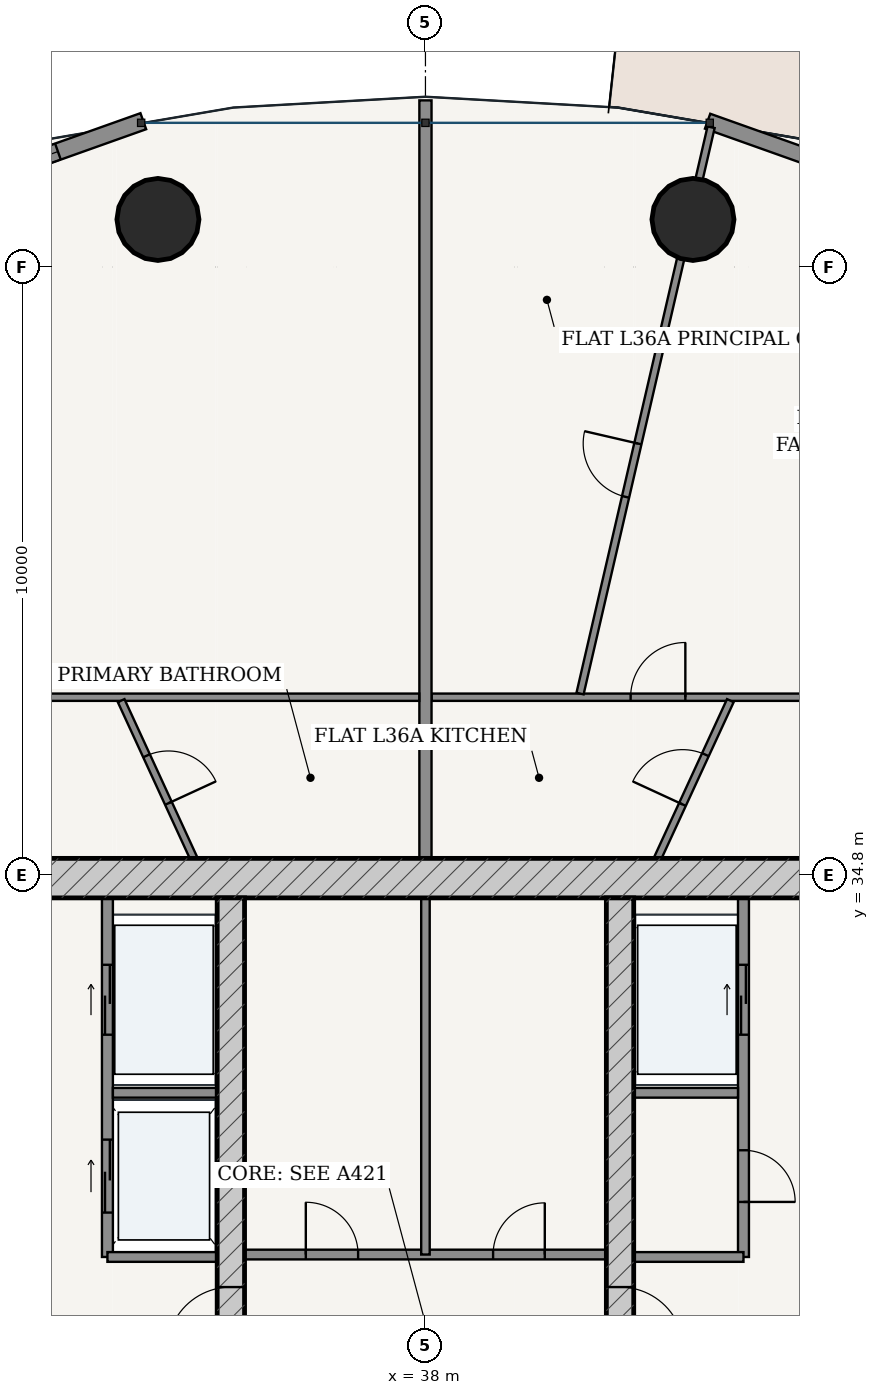
"""IFC4 building model, lengths in metres.
Left out: names, types, materials, properties, quantities, classifications, styles, units other than length and angle.
Written with IfcOpenShell. Run it as: python <this file> out.ifc"""

import sys

from ifc_helpers import new_model, si_unit, direction, frame, frame_2d, origin, origin_2d, place, context, subcontext, project, spatial, rectangle, hollow_circle, extrude, source, transform, mapped, element, fill, save


model = new_model("IFC4")
c1 = context("Model", 3, precision=1e-05, world=origin(), true_north=direction((-0.2419218956, 0.970295726276)))
c2 = subcontext(c1, "Body", "Model", "MODEL_VIEW")
j1 = project(units=[si_unit("LENGTHUNIT", "METRE"), si_unit("PLANEANGLEUNIT", "RADIAN")], contexts=[c1])
p1 = place(None, origin())
s1 = spatial("IfcSite", under=j1, at=p1, CompositionType="ELEMENT")
p2 = place(p1, origin())
s2 = spatial("IfcBuilding", under=s1, at=p2, CompositionType="ELEMENT")
p3 = place(p2, frame((0.0, 0.0, 139.0)))
s3 = spatial("IfcBuildingStorey", under=s2, at=p3, CompositionType="ELEMENT", Elevation=139.0)
p4 = place(p3, frame((28.725, 34.75, 0.0), z_axis=(0.0, 0.0, 1.0), x_axis=(1.0, 0.0, 0.0)))
e1 = element("IfcWall", 1, at=p4, inside=s3, PredefinedType="SHEAR", context=c2, shape_type="SweptSolid", body=[
    extrude(rectangle(XDim=18.55, YDim=0.65, at=frame_2d((9.275, 0.0))), origin(), (0.0, 0.0, 1.0), 3.33),
])
p5 = place(p3, frame((34.8, 19.175, 0.0), z_axis=(0.0, 0.0, 1.0), x_axis=(0.0, 1.0, 0.0)))
e2 = element("IfcWall", 2, at=p5, inside=s3, PredefinedType="SHEAR", context=c2, shape_type="SweptSolid", body=[
    extrude(rectangle(XDim=15.25, YDim=0.45, at=frame_2d((7.625, 0.0))), origin(), (0.0, 0.0, 1.0), 3.33),
])
p6 = place(p5, frame((7.8, 0.0, 0.0)))
e3 = element("IfcOpeningElement", 3, at=p6, cuts=e2, PredefinedType="OPENING", context=c2, shape_type="SweptSolid", body=[
    extrude(rectangle(XDim=1.05, YDim=2.15, at=frame_2d((0.525, 1.075))), frame((0.0, 0.235, 0.0), z_axis=(0.0, -1.0, 0.0), x_axis=(1.0, 0.0, 0.0)), (0.0, 0.0, 1.0), 0.47),
])
p7 = place(p3, frame((41.2, 19.175, 0.0), z_axis=(0.0, 0.0, 1.0), x_axis=(0.0, 1.0, 0.0)))
e4 = element("IfcWall", 4, at=p7, inside=s3, PredefinedType="SHEAR", context=c2, shape_type="SweptSolid", body=[
    extrude(rectangle(XDim=15.25, YDim=0.45, at=frame_2d((7.625, 0.0))), origin(), (0.0, 0.0, 1.0), 3.33),
])
p8 = place(p7, frame((7.8, 0.0, 0.0)))
e5 = element("IfcOpeningElement", 5, at=p8, cuts=e4, PredefinedType="OPENING", context=c2, shape_type="SweptSolid", body=[
    extrude(rectangle(XDim=1.05, YDim=2.15, at=frame_2d((0.525, 1.075))), frame((0.0, 0.235, 0.0), z_axis=(0.0, -1.0, 0.0), x_axis=(1.0, 0.0, 0.0)), (0.0, 0.0, 1.0), 0.47),
])
for number, where, z_axis, x_axis in (
    (6, (42.399, 45.582, 0.0), (0.0, 0.0, 1.0), (1.0, 0.0, 0.0)),
    (7, (33.601, 45.582, 0.0), (0.0, 0.0, 1.0), (1.0, 0.0, 0.0)),
):
    element("IfcColumn", number, at=place(p3, frame(where, z_axis=z_axis, x_axis=x_axis)), inside=s3, PredefinedType="COLUMN", context=c2, shape_type="SweptSolid", body=[
        extrude(hollow_circle(Radius=0.675, WallThickness=0.042, at=origin_2d()), origin(), (0.0, 0.0, 1.0), 3.6),
    ])
p9 = place(p3, frame((51.503, 44.043, 0.0), z_axis=(0.0, 0.0, 1.0), x_axis=(-0.942095406405, 0.335344964522, 0.0)))
e8 = element("IfcWall", 8, at=p9, inside=s3, PredefinedType="SOLIDWALL", context=c2, shape_type="SweptSolid", body=[
    extrude(rectangle(XDim=9.408, YDim=0.26, at=frame_2d((4.704, 0.0))), origin(), (0.0, 0.0, 1.0), 3.33),
])
p10 = place(p9, frame((4.029, 0.0, 0.0)))
e9 = element("IfcOpeningElement", 9, at=p10, cuts=e8, PredefinedType="OPENING", context=c2, shape_type="SweptSolid", body=[
    extrude(rectangle(XDim=1.35, YDim=2.2, at=frame_2d((0.675, 1.1))), frame((0.0, 0.14, 0.0), z_axis=(0.0, -1.0, 0.0), x_axis=(1.0, 0.0, 0.0)), (0.0, 0.0, 1.0), 0.28),
])
p11 = place(p3, frame((33.36, 47.198, 0.0), z_axis=(0.0, 0.0, 1.0), x_axis=(-0.942095406405, -0.335344964522, 0.0)))
e10 = element("IfcWall", 10, at=p11, inside=s3, PredefinedType="SOLIDWALL", context=c2, shape_type="SweptSolid", body=[
    extrude(rectangle(XDim=9.408, YDim=0.28, at=frame_2d((4.704, 0.0))), origin(), (0.0, 0.0, 1.0), 3.33),
])
p12 = place(p11, frame((1.49, 0.0, 0.85)))
e11 = element("IfcOpeningElement", 11, at=p12, cuts=e10, PredefinedType="OPENING", context=c2, shape_type="SweptSolid", body=[
    extrude(rectangle(XDim=2.1, YDim=1.95, at=frame_2d((1.05, 0.975))), frame((0.0, 0.15, 0.0), z_axis=(0.0, -1.0, 0.0), x_axis=(1.0, 0.0, 0.0)), (0.0, 0.0, 1.0), 0.3),
])
p13 = place(p11, frame((5.818, 0.0, 0.85)))
e12 = element("IfcOpeningElement", 12, at=p13, cuts=e10, PredefinedType="OPENING", context=c2, shape_type="SweptSolid", body=[
    extrude(rectangle(XDim=2.1, YDim=1.95, at=frame_2d((1.05, 0.975))), frame((0.0, 0.15, 0.0), z_axis=(0.0, -1.0, 0.0), x_axis=(1.0, 0.0, 0.0)), (0.0, 0.0, 1.0), 0.3),
])
p14 = place(p3, frame((32.77, 28.52, 0.0), z_axis=(0.0, 0.0, 1.0), x_axis=(0.0, 1.0, 0.0)))
e13 = element("IfcWall", 13, at=p14, inside=s3, PredefinedType="PARTITIONING", context=c2, shape_type="SweptSolid", body=[
    extrude(rectangle(XDim=5.905, YDim=0.18, at=frame_2d((2.953, 0.0))), origin(), (0.0, 0.0, 1.0), 3.33),
])
p15 = place(p14, frame((3.655, 0.0, 0.0)))
e14 = element("IfcOpeningElement", 14, at=p15, cuts=e13, PredefinedType="OPENING", context=c2, shape_type="SweptSolid", body=[
    extrude(rectangle(XDim=1.15, YDim=2.2, at=frame_2d((0.575, 1.1))), frame((0.0, 0.1, 0.0), z_axis=(0.0, -1.0, 0.0), x_axis=(1.0, 0.0, 0.0)), (0.0, 0.0, 1.0), 0.2),
])
p16 = place(p14, frame((0.73, 0.0, 0.0)))
e15 = element("IfcOpeningElement", 15, at=p16, cuts=e13, PredefinedType="OPENING", context=c2, shape_type="SweptSolid", body=[
    extrude(rectangle(XDim=1.2, YDim=2.25, at=frame_2d((0.6, 1.125))), frame((0.0, 0.1, 0.0), z_axis=(0.0, -1.0, 0.0), x_axis=(1.0, 0.0, 0.0)), (0.0, 0.0, 1.0), 0.2),
])
p17 = place(p3, frame((32.86, 31.22, 0.0), z_axis=(0.0, 0.0, 1.0), x_axis=(1.0, 0.0, 0.0)))
e16 = element("IfcWall", 16, at=p17, inside=s3, PredefinedType="PARTITIONING", context=c2, shape_type="SweptSolid", body=[
    extrude(rectangle(XDim=1.715, YDim=0.16, at=frame_2d((0.857, 0.0))), origin(), (0.0, 0.0, 1.0), 3.33),
])
p18 = place(p3, frame((32.77, 28.52, 0.0), z_axis=(0.0, 0.0, 1.0), x_axis=(1.0, 0.0, 0.0)))
e17 = element("IfcWall", 17, at=p18, inside=s3, PredefinedType="PARTITIONING", context=c2, shape_type="SweptSolid", body=[
    extrude(rectangle(XDim=1.805, YDim=0.16, at=frame_2d((0.902, 0.0))), origin(), (0.0, 0.0, 1.0), 3.33),
])
p19 = place(p3, frame((43.23, 28.52, 0.0), z_axis=(0.0, 0.0, 1.0), x_axis=(0.0, 1.0, 0.0)))
e18 = element("IfcWall", 18, at=p19, inside=s3, PredefinedType="PARTITIONING", context=c2, shape_type="SweptSolid", body=[
    extrude(rectangle(XDim=5.905, YDim=0.18, at=frame_2d((2.953, 0.0))), origin(), (0.0, 0.0, 1.0), 3.33),
])
p20 = place(p19, frame((0.905, 0.0, 0.0)))
e19 = element("IfcOpeningElement", 19, at=p20, cuts=e18, PredefinedType="OPENING", context=c2, shape_type="SweptSolid", body=[
    extrude(rectangle(XDim=0.85, YDim=2.1, at=frame_2d((0.425, 1.05))), frame((0.0, 0.1, 0.0), z_axis=(0.0, -1.0, 0.0), x_axis=(1.0, 0.0, 0.0)), (0.0, 0.0, 1.0), 0.2),
])
p21 = place(p19, frame((3.655, 0.0, 0.0)))
e20 = element("IfcOpeningElement", 20, at=p21, cuts=e18, PredefinedType="OPENING", context=c2, shape_type="SweptSolid", body=[
    extrude(rectangle(XDim=1.15, YDim=2.2, at=frame_2d((0.575, 1.1))), frame((0.0, 0.1, 0.0), z_axis=(0.0, -1.0, 0.0), x_axis=(1.0, 0.0, 0.0)), (0.0, 0.0, 1.0), 0.2),
])
p22 = place(p3, frame((41.425, 31.22, 0.0), z_axis=(0.0, 0.0, 1.0), x_axis=(1.0, 0.0, 0.0)))
e21 = element("IfcWall", 21, at=p22, inside=s3, PredefinedType="PARTITIONING", context=c2, shape_type="SweptSolid", body=[
    extrude(rectangle(XDim=1.715, YDim=0.16, at=frame_2d((0.857, 0.0))), origin(), (0.0, 0.0, 1.0), 3.33),
])
p23 = place(p3, frame((41.425, 28.52, 0.0), z_axis=(0.0, 0.0, 1.0), x_axis=(1.0, 0.0, 0.0)))
e22 = element("IfcWall", 22, at=p23, inside=s3, PredefinedType="PARTITIONING", context=c2, shape_type="SweptSolid", body=[
    extrude(rectangle(XDim=1.805, YDim=0.16, at=frame_2d((0.902, 0.0))), origin(), (0.0, 0.0, 1.0), 3.33),
])
p24 = place(p3, frame((35.025, 28.56, 0.0), z_axis=(0.0, 0.0, 1.0), x_axis=(1.0, 0.0, 0.0)))
e23 = element("IfcWall", 23, at=p24, inside=s3, PredefinedType="PARTITIONING", context=c2, shape_type="SweptSolid", body=[
    extrude(rectangle(XDim=5.95, YDim=0.16, at=frame_2d((2.975, 0.0))), origin(), (0.0, 0.0, 1.0), 3.33),
])
p25 = place(p24, frame((1.008, 0.0, 0.0)))
e24 = element("IfcOpeningElement", 24, at=p25, cuts=e23, PredefinedType="OPENING", context=c2, shape_type="SweptSolid", body=[
    extrude(rectangle(XDim=0.86, YDim=2.1, at=frame_2d((0.43, 1.05))), frame((0.0, 0.09, 0.0), z_axis=(0.0, -1.0, 0.0), x_axis=(1.0, 0.0, 0.0)), (0.0, 0.0, 1.0), 0.18),
])
p26 = place(p24, frame((4.087, 0.0, 0.0)))
e25 = element("IfcOpeningElement", 25, at=p26, cuts=e23, PredefinedType="OPENING", context=c2, shape_type="SweptSolid", body=[
    extrude(rectangle(XDim=0.85, YDim=2.1, at=frame_2d((0.425, 1.05))), frame((0.0, 0.09, 0.0), z_axis=(0.0, -1.0, 0.0), x_axis=(1.0, 0.0, 0.0)), (0.0, 0.0, 1.0), 0.18),
])
p27 = place(p3, frame((38.0, 28.56, 0.0), z_axis=(0.0, 0.0, 1.0), x_axis=(0.0, 1.0, 0.0)))
e26 = element("IfcWall", 26, at=p27, inside=s3, PredefinedType="PARTITIONING", context=c2, shape_type="SweptSolid", body=[
    extrude(rectangle(XDim=5.865, YDim=0.14, at=frame_2d((2.933, 0.0))), origin(), (0.0, 0.0, 1.0), 3.33),
])
p28 = place(p3, frame((38.102, 37.725, 0.0), z_axis=(0.0, 0.0, 1.0), x_axis=(1.0, 0.0, 0.0)))
e27 = element("IfcWall", 27, at=p28, inside=s3, PredefinedType="PARTITIONING", context=c2, shape_type="SweptSolid", body=[
    extrude(rectangle(XDim=6.363, YDim=0.12, at=frame_2d((3.182, 0.0))), origin(), (0.0, 0.0, 1.0), 2.776),
])
p29 = place(p28, frame((3.272, 0.0, 0.0)))
e28 = element("IfcOpeningElement", 28, at=p29, cuts=e27, PredefinedType="OPENING", context=c2, shape_type="SweptSolid", body=[
    extrude(rectangle(XDim=0.9, YDim=2.15, at=frame_2d((0.45, 1.075))), frame((0.0, 0.07, 0.0), z_axis=(0.0, -1.0, 0.0), x_axis=(1.0, 0.0, 0.0)), (0.0, 0.0, 1.0), 0.14),
])
p30 = place(p3, frame((40.542, 37.785, 0.0), z_axis=(0.0, 0.0, 1.0), x_axis=(0.225467545633, 0.974250679171, 0.0)))
e29 = element("IfcWall", 29, at=p30, inside=s3, PredefinedType="PARTITIONING", context=c2, shape_type="SweptSolid", body=[
    extrude(rectangle(XDim=9.559, YDim=0.12, at=frame_2d((4.78, 0.0))), origin(), (0.0, 0.0, 1.0), 2.776),
])
p31 = place(p30, frame((3.32, 0.0, 0.0)))
e30 = element("IfcOpeningElement", 30, at=p31, cuts=e29, PredefinedType="OPENING", context=c2, shape_type="SweptSolid", body=[
    extrude(rectangle(XDim=0.9, YDim=2.15, at=frame_2d((0.45, 1.075))), frame((0.0, 0.07, 0.0), z_axis=(0.0, -1.0, 0.0), x_axis=(1.0, 0.0, 0.0)), (0.0, 0.0, 1.0), 0.14),
])
p32 = place(p3, frame((41.817, 35.075, 0.0), z_axis=(0.0, 0.0, 1.0), x_axis=(0.418890148101, 0.908036917655, 0.0)))
e31 = element("IfcWall", 31, at=p32, inside=s3, PredefinedType="PARTITIONING", context=c2, shape_type="SweptSolid", body=[
    extrude(rectangle(XDim=2.856, YDim=0.12, at=frame_2d((1.428, 0.0))), origin(), (0.0, 0.0, 1.0), 3.33),
])
p33 = place(p32, frame((0.978, 0.0, 0.0)))
e32 = element("IfcOpeningElement", 32, at=p33, cuts=e31, PredefinedType="OPENING", context=c2, shape_type="SweptSolid", body=[
    extrude(rectangle(XDim=0.9, YDim=2.15, at=frame_2d((0.45, 1.075))), frame((0.0, 0.07, 0.0), z_axis=(0.0, -1.0, 0.0), x_axis=(1.0, 0.0, 0.0)), (0.0, 0.0, 1.0), 0.14),
])
p34 = place(p3, frame((38.0, 35.075, 0.0), z_axis=(0.0, 0.0, 1.0), x_axis=(0.0, 1.0, 0.0)))
e33 = element("IfcWall", 33, at=p34, inside=s3, PredefinedType="PARTITIONING", context=c2, shape_type="SweptSolid", body=[
    extrude(rectangle(XDim=12.465, YDim=0.2, at=frame_2d((6.232, 0.0))), origin(), (0.0, 0.0, 1.0), 2.415),
])
p35 = place(p3, frame((31.535, 37.725, 0.0), z_axis=(0.0, 0.0, 1.0), x_axis=(1.0, 0.0, 0.0)))
e34 = element("IfcWall", 34, at=p35, inside=s3, PredefinedType="PARTITIONING", context=c2, shape_type="SweptSolid", body=[
    extrude(rectangle(XDim=6.363, YDim=0.12, at=frame_2d((3.182, 0.0))), origin(), (0.0, 0.0, 1.0), 2.776),
])
p36 = place(p3, frame((34.19, 35.075, 0.0), z_axis=(0.0, 0.0, 1.0), x_axis=(-0.418255585009, 0.908329381672, 0.0)))
e35 = element("IfcWall", 35, at=p36, inside=s3, PredefinedType="PARTITIONING", context=c2, shape_type="SweptSolid", body=[
    extrude(rectangle(XDim=2.855, YDim=0.12, at=frame_2d((1.428, 0.0))), origin(), (0.0, 0.0, 1.0), 3.33),
])
p37 = place(p36, frame((0.998, 0.0, 0.0)))
e36 = element("IfcOpeningElement", 36, at=p37, cuts=e35, PredefinedType="OPENING", context=c2, shape_type="SweptSolid", body=[
    extrude(rectangle(XDim=0.86, YDim=2.15, at=frame_2d((0.43, 1.075))), frame((0.0, 0.07, 0.0), z_axis=(0.0, -1.0, 0.0), x_axis=(1.0, 0.0, 0.0)), (0.0, 0.0, 1.0), 0.14),
])
m1 = source(origin(), c2, "Body", "SweptSolid", [
    extrude(rectangle(XDim=2.1, YDim=1.95, at=frame_2d((1.05, 0.975))), frame((0.0, 0.03, 0.0), z_axis=(0.0, -1.0, 0.0), x_axis=(1.0, 0.0, 0.0)), (0.0, 0.0, 1.0), 0.06),
])
p38 = place(p12, origin())
e37 = element("IfcWindow", 37, at=p38, inside=s3, PartitioningType="SINGLE_PANEL", PredefinedType="WINDOW", context=c2, shape_type="MappedRepresentation", body=[
    mapped(m1, transform((0.0, 0.0, 0.0), scale=1.0)),
])
fill(e11, e37)
m2 = source(origin(), c2, "Body", "SweptSolid", [
    extrude(rectangle(XDim=1.05, YDim=2.15, at=frame_2d((0.525, 1.075))), frame((0.0, 0.025, 0.0), z_axis=(0.0, -1.0, 0.0), x_axis=(1.0, 0.0, 0.0)), (0.0, 0.0, 1.0), 0.05),
])
p39 = place(p6, origin())
e38 = element("IfcDoor", 38, at=p39, inside=s3, OperationType="SINGLE_SWING_LEFT", PredefinedType="DOOR", context=c2, shape_type="MappedRepresentation", body=[
    mapped(m2, transform((0.0, 0.0, 0.0), scale=1.0)),
])
fill(e3, e38)
p40 = place(p8, frame((1.05, 0.0, 0.0), z_axis=(0.0, 0.0, 1.0), x_axis=(-1.0, 0.0, 0.0)))
e39 = element("IfcDoor", 39, at=p40, inside=s3, OperationType="SINGLE_SWING_RIGHT", PredefinedType="DOOR", context=c2, shape_type="MappedRepresentation", body=[
    mapped(m2, transform((0.0, 0.0, 0.0), scale=1.0)),
])
fill(e5, e39)
m3 = source(origin(), c2, "Body", "SweptSolid", [
    extrude(rectangle(XDim=0.85, YDim=2.1, at=frame_2d((0.425, 1.05))), frame((0.0, 0.025, 0.0), z_axis=(0.0, -1.0, 0.0), x_axis=(1.0, 0.0, 0.0)), (0.0, 0.0, 1.0), 0.05),
])
p41 = place(p20, frame((0.85, 0.0, 0.0), z_axis=(0.0, 0.0, 1.0), x_axis=(-1.0, 0.0, 0.0)))
e40 = element("IfcDoor", 40, at=p41, inside=s3, OperationType="SINGLE_SWING_RIGHT", PredefinedType="DOOR", context=c2, shape_type="MappedRepresentation", body=[
    mapped(m3, transform((0.0, 0.0, 0.0), scale=1.0)),
])
fill(e19, e40)
m4 = source(origin(), c2, "Body", "SweptSolid", [
    extrude(rectangle(XDim=0.86, YDim=2.1, at=frame_2d((0.43, 1.05))), frame((0.0, 0.025, 0.0), z_axis=(0.0, -1.0, 0.0), x_axis=(1.0, 0.0, 0.0)), (0.0, 0.0, 1.0), 0.05),
])
p42 = place(p25, origin())
e41 = element("IfcDoor", 41, at=p42, inside=s3, OperationType="SINGLE_SWING_LEFT", PredefinedType="DOOR", context=c2, shape_type="MappedRepresentation", body=[
    mapped(m4, transform((0.0, 0.0, 0.0), scale=1.0)),
])
fill(e24, e41)
p43 = place(p26, origin())
e42 = element("IfcDoor", 42, at=p43, inside=s3, OperationType="SINGLE_SWING_RIGHT", PredefinedType="DOOR", context=c2, shape_type="MappedRepresentation", body=[
    mapped(m3, transform((0.0, 0.0, 0.0), scale=1.0)),
])
fill(e25, e42)
m5 = source(origin(), c2, "Body", "SweptSolid", [
    extrude(rectangle(XDim=1.15, YDim=2.2, at=frame_2d((0.575, 1.1))), frame((0.0, 0.025, 0.0), z_axis=(0.0, -1.0, 0.0), x_axis=(1.0, 0.0, 0.0)), (0.0, 0.0, 1.0), 0.05),
])
p44 = place(p15, origin())
e43 = element("IfcDoor", 43, at=p44, inside=s3, OperationType="DOUBLE_DOOR_SLIDING", PredefinedType="DOOR", context=c2, shape_type="MappedRepresentation", body=[
    mapped(m5, transform((0.0, 0.0, 0.0), scale=1.0)),
])
fill(e14, e43)
p45 = place(p21, origin())
e44 = element("IfcDoor", 44, at=p45, inside=s3, OperationType="DOUBLE_DOOR_SLIDING", PredefinedType="DOOR", context=c2, shape_type="MappedRepresentation", body=[
    mapped(m5, transform((0.0, 0.0, 0.0), scale=1.0)),
])
fill(e20, e44)
m6 = source(origin(), c2, "Body", "SweptSolid", [
    extrude(rectangle(XDim=1.2, YDim=2.25, at=frame_2d((0.6, 1.125))), frame((0.0, 0.025, 0.0), z_axis=(0.0, -1.0, 0.0), x_axis=(1.0, 0.0, 0.0)), (0.0, 0.0, 1.0), 0.05),
])
p46 = place(p16, origin())
e45 = element("IfcDoor", 45, at=p46, inside=s3, OperationType="DOUBLE_DOOR_SLIDING", PredefinedType="DOOR", context=c2, shape_type="MappedRepresentation", body=[
    mapped(m6, transform((0.0, 0.0, 0.0), scale=1.0)),
])
fill(e15, e45)
m7 = source(origin(), c2, "Body", "SweptSolid", [
    extrude(rectangle(XDim=0.9, YDim=2.15, at=frame_2d((0.45, 1.075))), frame((0.0, 0.025, 0.0), z_axis=(0.0, -1.0, 0.0), x_axis=(1.0, 0.0, 0.0)), (0.0, 0.0, 1.0), 0.05),
])
p47 = place(p33, origin())
e46 = element("IfcDoor", 46, at=p47, inside=s3, OperationType="SINGLE_SWING_LEFT", PredefinedType="DOOR", context=c2, shape_type="MappedRepresentation", body=[
    mapped(m7, transform((0.0, 0.0, 0.0), scale=1.0)),
])
fill(e32, e46)
p48 = place(p29, origin())
e47 = element("IfcDoor", 47, at=p48, inside=s3, OperationType="SINGLE_SWING_RIGHT", PredefinedType="DOOR", context=c2, shape_type="MappedRepresentation", body=[
    mapped(m7, transform((0.0, 0.0, 0.0), scale=1.0)),
])
fill(e28, e47)
p49 = place(p31, origin())
e48 = element("IfcDoor", 48, at=p49, inside=s3, OperationType="SINGLE_SWING_RIGHT", PredefinedType="DOOR", context=c2, shape_type="MappedRepresentation", body=[
    mapped(m7, transform((0.0, 0.0, 0.0), scale=1.0)),
])
fill(e30, e48)
m8 = source(origin(), c2, "Body", "SweptSolid", [
    extrude(rectangle(XDim=0.86, YDim=2.15, at=frame_2d((0.43, 1.075))), frame((0.0, 0.025, 0.0), z_axis=(0.0, -1.0, 0.0), x_axis=(1.0, 0.0, 0.0)), (0.0, 0.0, 1.0), 0.05),
])
p50 = place(p37, frame((0.86, 0.0, 0.0), z_axis=(0.0, 0.0, 1.0), x_axis=(-1.0, 0.0, 0.0)))
e49 = element("IfcDoor", 49, at=p50, inside=s3, OperationType="SINGLE_SWING_RIGHT", PredefinedType="DOOR", context=c2, shape_type="MappedRepresentation", body=[
    mapped(m8, transform((0.0, 0.0, 0.0), scale=1.0)),
])
fill(e36, e49)
save(model, sys.argv[1])
